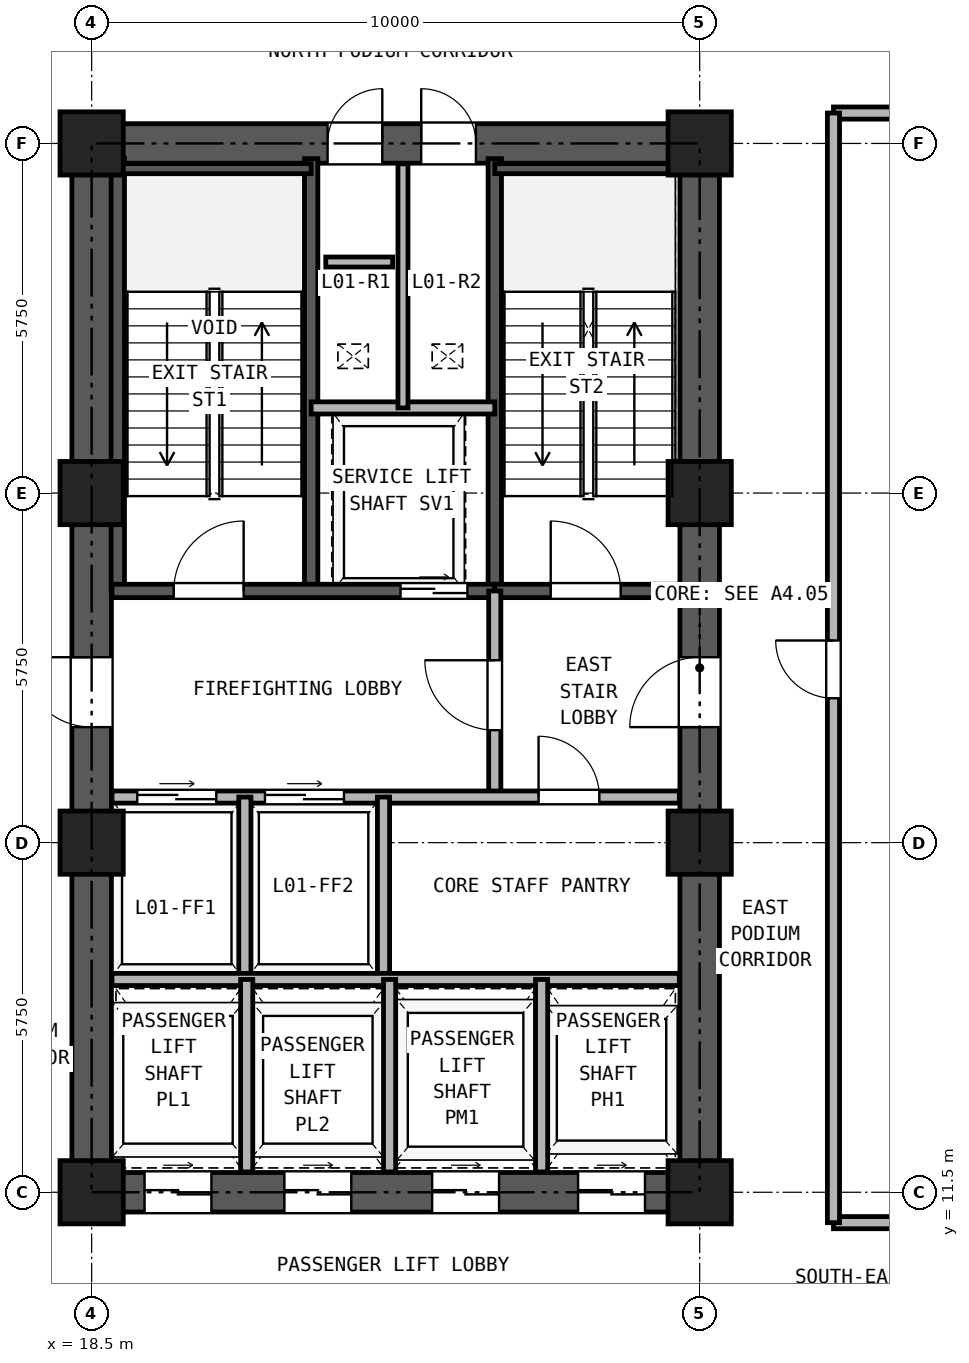
"""IFC4 building model, lengths in metres.
Left out: names, types, materials, properties, quantities, classifications, styles, units other than length and angle.
Written with IfcOpenShell. Run it as: python <this file> out.ifc"""

import sys

from ifc_helpers import new_model, si_unit, direction, frame, frame_2d, origin, origin_2d, place, context, subcontext, project, spatial, rectangle, hollow_rectangle, extrude, source, transform, mapped, element, fill, save


model = new_model("IFC4")
c1 = context("Model", 3, precision=1e-05, world=origin(), true_north=direction((0.0, 1.0)))
c2 = subcontext(c1, "Body", "Model", "MODEL_VIEW")
j1 = project(units=[si_unit("LENGTHUNIT", "METRE"), si_unit("PLANEANGLEUNIT", "RADIAN")], contexts=[c1])
p1 = place(None, origin())
s1 = spatial("IfcSite", under=j1, at=p1, CompositionType="ELEMENT")
p2 = place(p1, origin())
s2 = spatial("IfcBuilding", under=s1, at=p2, CompositionType="ELEMENT")
p3 = place(p2, frame((0.0, 0.0, 4.5)))
s3 = spatial("IfcBuildingStorey", under=s2, at=p3, CompositionType="ELEMENT", Elevation=4.5)
m1 = source(origin(), c2, "Body", "SweptSolid", [
    extrude(hollow_rectangle(XDim=1.04, YDim=1.04, WallThickness=0.065, at=origin_2d()), origin(), (0.0, 0.0, 1.0), 4.18),
])
for number, where, z_axis, x_axis in (
    (1, (18.5, 11.5, 0.0), (0.0, 0.0, 1.0), (1.0, 0.0, 0.0)),
    (2, (18.5, 17.25, 0.0), (0.0, 0.0, 1.0), (1.0, 0.0, 0.0)),
    (3, (18.5, 23.0, 0.0), (0.0, 0.0, 1.0), (1.0, 0.0, 0.0)),
    (4, (18.5, 28.75, 0.0), (0.0, 0.0, 1.0), (1.0, 0.0, 0.0)),
    (5, (28.5, 11.5, 0.0), (0.0, 0.0, 1.0), (1.0, 0.0, 0.0)),
    (6, (28.5, 17.25, 0.0), (0.0, 0.0, 1.0), (1.0, 0.0, 0.0)),
    (7, (28.5, 23.0, 0.0), (0.0, 0.0, 1.0), (1.0, 0.0, 0.0)),
    (8, (28.5, 28.75, 0.0), (0.0, 0.0, 1.0), (1.0, 0.0, 0.0)),
):
    element("IfcColumn", number, at=place(p3, frame(where, z_axis=z_axis, x_axis=x_axis)), inside=s3, PredefinedType="COLUMN", context=c2, shape_type="MappedRepresentation", body=[
        mapped(m1, transform((0.0, 0.0, 0.0), x_axis=(1.0, 0.0, 0.0), y_axis=(0.0, 1.0, 0.0), z_axis=(0.0, 0.0, 1.0), scale=1.0)),
    ])
p4 = place(p3, frame((18.175, 11.5, 0.0), z_axis=(0.0, 0.0, 1.0), x_axis=(1.0, 0.0, 0.0)))
e9 = element("IfcWall", 9, at=p4, inside=s3, PredefinedType="SHEAR", context=c2, shape_type="SweptSolid", body=[
    extrude(rectangle(XDim=10.65, YDim=0.65, at=frame_2d((5.325, 0.0))), origin(), (0.0, 0.0, 1.0), 4.18),
])
p5 = place(p4, frame((1.195, 0.0, 0.0)))
e10 = element("IfcOpeningElement", 10, at=p5, cuts=e9, PredefinedType="OPENING", context=c2, shape_type="SweptSolid", body=[
    extrude(rectangle(XDim=1.1, YDim=2.25, at=frame_2d((0.55, 1.125))), frame((0.0, 0.335, 0.0), z_axis=(0.0, -1.0, 0.0), x_axis=(1.0, 0.0, 0.0)), (0.0, 0.0, 1.0), 0.67),
])
p6 = place(p4, frame((3.495, 0.0, 0.0)))
e11 = element("IfcOpeningElement", 11, at=p6, cuts=e9, PredefinedType="OPENING", context=c2, shape_type="SweptSolid", body=[
    extrude(rectangle(XDim=1.1, YDim=2.25, at=frame_2d((0.55, 1.125))), frame((0.0, 0.335, 0.0), z_axis=(0.0, -1.0, 0.0), x_axis=(1.0, 0.0, 0.0)), (0.0, 0.0, 1.0), 0.67),
])
p7 = place(p4, frame((5.925, 0.0, 0.0)))
e12 = element("IfcOpeningElement", 12, at=p7, cuts=e9, PredefinedType="OPENING", context=c2, shape_type="SweptSolid", body=[
    extrude(rectangle(XDim=1.1, YDim=2.25, at=frame_2d((0.55, 1.125))), frame((0.0, 0.335, 0.0), z_axis=(0.0, -1.0, 0.0), x_axis=(1.0, 0.0, 0.0)), (0.0, 0.0, 1.0), 0.67),
])
p8 = place(p4, frame((8.325, 0.0, 0.0)))
e13 = element("IfcOpeningElement", 13, at=p8, cuts=e9, PredefinedType="OPENING", context=c2, shape_type="SweptSolid", body=[
    extrude(rectangle(XDim=1.1, YDim=2.25, at=frame_2d((0.55, 1.125))), frame((0.0, 0.335, 0.0), z_axis=(0.0, -1.0, 0.0), x_axis=(1.0, 0.0, 0.0)), (0.0, 0.0, 1.0), 0.67),
])
p9 = place(p3, frame((18.175, 28.75, 0.0), z_axis=(0.0, 0.0, 1.0), x_axis=(1.0, 0.0, 0.0)))
e14 = element("IfcWall", 14, at=p9, inside=s3, PredefinedType="SHEAR", context=c2, shape_type="SweptSolid", body=[
    extrude(rectangle(XDim=10.65, YDim=0.65, at=frame_2d((5.325, 0.0))), origin(), (0.0, 0.0, 1.0), 4.18),
])
p10 = place(p9, frame((4.205, 0.0, 0.0)))
e15 = element("IfcOpeningElement", 15, at=p10, cuts=e14, PredefinedType="OPENING", context=c2, shape_type="SweptSolid", body=[
    extrude(rectangle(XDim=0.9, YDim=2.05, at=frame_2d((0.45, 1.025))), frame((0.0, 0.335, 0.0), z_axis=(0.0, -1.0, 0.0), x_axis=(1.0, 0.0, 0.0)), (0.0, 0.0, 1.0), 0.67),
])
p11 = place(p9, frame((5.745, 0.0, 0.0)))
e16 = element("IfcOpeningElement", 16, at=p11, cuts=e14, PredefinedType="OPENING", context=c2, shape_type="SweptSolid", body=[
    extrude(rectangle(XDim=0.9, YDim=2.05, at=frame_2d((0.45, 1.025))), frame((0.0, 0.335, 0.0), z_axis=(0.0, -1.0, 0.0), x_axis=(1.0, 0.0, 0.0)), (0.0, 0.0, 1.0), 0.67),
])
p12 = place(p3, frame((18.5, 11.825, 0.0), z_axis=(0.0, 0.0, 1.0), x_axis=(0.0, 1.0, 0.0)))
e17 = element("IfcWall", 17, at=p12, inside=s3, PredefinedType="SHEAR", context=c2, shape_type="SweptSolid", body=[
    extrude(rectangle(XDim=16.6, YDim=0.65, at=frame_2d((8.3, 0.0))), origin(), (0.0, 0.0, 1.0), 4.18),
])
p13 = place(p12, frame((7.325, 0.0, 0.0)))
e18 = element("IfcOpeningElement", 18, at=p13, cuts=e17, PredefinedType="OPENING", context=c2, shape_type="SweptSolid", body=[
    extrude(rectangle(XDim=1.15, YDim=2.2, at=frame_2d((0.575, 1.1))), frame((0.0, 0.335, 0.0), z_axis=(0.0, -1.0, 0.0), x_axis=(1.0, 0.0, 0.0)), (0.0, 0.0, 1.0), 0.67),
])
p14 = place(p3, frame((28.5, 11.825, 0.0), z_axis=(0.0, 0.0, 1.0), x_axis=(0.0, 1.0, 0.0)))
e19 = element("IfcWall", 19, at=p14, inside=s3, PredefinedType="SHEAR", context=c2, shape_type="SweptSolid", body=[
    extrude(rectangle(XDim=16.6, YDim=0.65, at=frame_2d((8.3, 0.0))), origin(), (0.0, 0.0, 1.0), 4.18),
])
p15 = place(p14, frame((7.325, 0.0, 0.0)))
e20 = element("IfcOpeningElement", 20, at=p15, cuts=e19, PredefinedType="OPENING", context=c2, shape_type="SweptSolid", body=[
    extrude(rectangle(XDim=1.15, YDim=2.2, at=frame_2d((0.575, 1.1))), frame((0.0, 0.335, 0.0), z_axis=(0.0, -1.0, 0.0), x_axis=(1.0, 0.0, 0.0)), (0.0, 0.0, 1.0), 0.67),
])
for number, where, z_axis, x_axis in (
    (21, (18.93, 21.39, 0.0), (0.0, 0.0, 1.0), (0.0, 1.0, 0.0)),
    (22, (22.11, 21.39, 0.0), (0.0, 0.0, 1.0), (0.0, 1.0, 0.0)),
    (23, (25.13, 21.39, 0.0), (0.0, 0.0, 1.0), (0.0, 1.0, 0.0)),
):
    element("IfcWall", number, at=place(p3, frame(where, z_axis=z_axis, x_axis=x_axis)), inside=s3, PredefinedType="SOLIDWALL", context=c2, shape_type="SweptSolid", body=[
        extrude(rectangle(XDim=7.11, YDim=0.22, at=frame_2d((3.555, 0.0))), origin(), (0.0, 0.0, 1.0), 4.18),
    ])
p16 = place(p3, frame((18.835, 28.335, 0.0), z_axis=(0.0, 0.0, 1.0), x_axis=(1.0, 0.0, 0.0)))
e24 = element("IfcWall", 24, at=p16, inside=s3, PredefinedType="PARTITIONING", context=c2, shape_type="SweptSolid", body=[
    extrude(rectangle(XDim=3.275, YDim=0.165, at=frame_2d((1.638, 0.0))), origin(), (0.0, 0.0, 1.0), 4.18),
])
p17 = place(p3, frame((25.13, 28.335, 0.0), z_axis=(0.0, 0.0, 1.0), x_axis=(1.0, 0.0, 0.0)))
e25 = element("IfcWall", 25, at=p17, inside=s3, PredefinedType="PARTITIONING", context=c2, shape_type="SweptSolid", body=[
    extrude(rectangle(XDim=3.035, YDim=0.165, at=frame_2d((1.518, 0.0))), origin(), (0.0, 0.0, 1.0), 4.18),
])
p18 = place(p3, frame((18.835, 21.39, 0.0), z_axis=(0.0, 0.0, 1.0), x_axis=(1.0, 0.0, 0.0)))
e26 = element("IfcWall", 26, at=p18, inside=s3, PredefinedType="SOLIDWALL", context=c2, shape_type="SweptSolid", body=[
    extrude(rectangle(XDim=6.295, YDim=0.22, at=frame_2d((3.147, 0.0))), origin(), (0.0, 0.0, 1.0), 4.18),
])
p19 = place(p18, frame((1.015, 0.0, 0.0)))
e27 = element("IfcOpeningElement", 27, at=p19, cuts=e26, PredefinedType="OPENING", context=c2, shape_type="SweptSolid", body=[
    extrude(rectangle(XDim=1.15, YDim=2.2, at=frame_2d((0.575, 1.1))), frame((0.0, 0.12, 0.0), z_axis=(0.0, -1.0, 0.0), x_axis=(1.0, 0.0, 0.0)), (0.0, 0.0, 1.0), 0.24),
])
p20 = place(p18, frame((4.745, 0.0, 0.0)))
e28 = element("IfcOpeningElement", 28, at=p20, cuts=e26, PredefinedType="OPENING", context=c2, shape_type="SweptSolid", body=[
    extrude(rectangle(XDim=1.1, YDim=2.25, at=frame_2d((0.55, 1.125))), frame((0.0, 0.12, 0.0), z_axis=(0.0, -1.0, 0.0), x_axis=(1.0, 0.0, 0.0)), (0.0, 0.0, 1.0), 0.24),
])
p21 = place(p3, frame((25.13, 21.39, 0.0), z_axis=(0.0, 0.0, 1.0), x_axis=(1.0, 0.0, 0.0)))
e29 = element("IfcWall", 29, at=p21, inside=s3, PredefinedType="SOLIDWALL", context=c2, shape_type="SweptSolid", body=[
    extrude(rectangle(XDim=3.035, YDim=0.22, at=frame_2d((1.518, 0.0))), origin(), (0.0, 0.0, 1.0), 4.18),
])
p22 = place(p21, frame((0.92, 0.0, 0.0)))
e30 = element("IfcOpeningElement", 30, at=p22, cuts=e29, PredefinedType="OPENING", context=c2, shape_type="SweptSolid", body=[
    extrude(rectangle(XDim=1.15, YDim=2.2, at=frame_2d((0.575, 1.1))), frame((0.0, 0.12, 0.0), z_axis=(0.0, -1.0, 0.0), x_axis=(1.0, 0.0, 0.0)), (0.0, 0.0, 1.0), 0.24),
])
p23 = place(p3, frame((22.11, 24.4, 0.0), z_axis=(0.0, 0.0, 1.0), x_axis=(1.0, 0.0, 0.0)))
e31 = element("IfcWall", 31, at=p23, inside=s3, PredefinedType="PARTITIONING", context=c2, shape_type="SweptSolid", body=[
    extrude(rectangle(XDim=3.02, YDim=0.2, at=frame_2d((1.51, 0.0))), origin(), (0.0, 0.0, 1.0), 4.18),
])
p24 = place(p3, frame((23.62, 24.4, 0.0), z_axis=(0.0, 0.0, 1.0), x_axis=(0.0, 1.0, 0.0)))
e32 = element("IfcWall", 32, at=p24, inside=s3, PredefinedType="PARTITIONING", context=c2, shape_type="SweptSolid", body=[
    extrude(rectangle(XDim=4.015, YDim=0.165, at=frame_2d((2.008, 0.0))), origin(), (0.0, 0.0, 1.0), 4.18),
])
p25 = place(p3, frame((25.13, 18.0, 0.0), z_axis=(0.0, 0.0, 1.0), x_axis=(0.0, 1.0, 0.0)))
e33 = element("IfcWall", 33, at=p25, inside=s3, PredefinedType="PARTITIONING", context=c2, shape_type="SweptSolid", body=[
    extrude(rectangle(XDim=3.39, YDim=0.2, at=frame_2d((1.695, 0.0))), origin(), (0.0, 0.0, 1.0), 4.18),
])
p26 = place(p25, frame((1.1, 0.0, 0.0)))
e34 = element("IfcOpeningElement", 34, at=p26, cuts=e33, PredefinedType="OPENING", context=c2, shape_type="SweptSolid", body=[
    extrude(rectangle(XDim=1.15, YDim=2.2, at=frame_2d((0.575, 1.1))), frame((0.0, 0.11, 0.0), z_axis=(0.0, -1.0, 0.0), x_axis=(1.0, 0.0, 0.0)), (0.0, 0.0, 1.0), 0.22),
])
p27 = place(p3, frame((18.835, 18.0, 0.0), z_axis=(0.0, 0.0, 1.0), x_axis=(1.0, 0.0, 0.0)))
e35 = element("IfcWall", 35, at=p27, inside=s3, PredefinedType="PARTITIONING", context=c2, shape_type="SweptSolid", body=[
    extrude(rectangle(XDim=9.33, YDim=0.2, at=frame_2d((4.665, 0.0))), origin(), (0.0, 0.0, 1.0), 4.18),
])
p28 = place(p27, frame((0.415, 0.0, 0.0)))
e36 = element("IfcOpeningElement", 36, at=p28, cuts=e35, PredefinedType="OPENING", context=c2, shape_type="SweptSolid", body=[
    extrude(rectangle(XDim=1.3, YDim=2.3, at=frame_2d((0.65, 1.15))), frame((0.0, 0.11, 0.0), z_axis=(0.0, -1.0, 0.0), x_axis=(1.0, 0.0, 0.0)), (0.0, 0.0, 1.0), 0.22),
])
p29 = place(p27, frame((2.515, 0.0, 0.0)))
e37 = element("IfcOpeningElement", 37, at=p29, cuts=e35, PredefinedType="OPENING", context=c2, shape_type="SweptSolid", body=[
    extrude(rectangle(XDim=1.3, YDim=2.3, at=frame_2d((0.65, 1.15))), frame((0.0, 0.11, 0.0), z_axis=(0.0, -1.0, 0.0), x_axis=(1.0, 0.0, 0.0)), (0.0, 0.0, 1.0), 0.22),
])
p30 = place(p27, frame((7.015, 0.0, 0.0)))
e38 = element("IfcOpeningElement", 38, at=p30, cuts=e35, PredefinedType="OPENING", context=c2, shape_type="SweptSolid", body=[
    extrude(rectangle(XDim=1.0, YDim=2.15, at=frame_2d((0.5, 1.075))), frame((0.0, 0.11, 0.0), z_axis=(0.0, -1.0, 0.0), x_axis=(1.0, 0.0, 0.0)), (0.0, 0.0, 1.0), 0.22),
])
for number, where, z_axis, x_axis in (
    (39, (21.02, 15.0, 0.0), (0.0, 0.0, 1.0), (0.0, 1.0, 0.0)),
    (40, (23.3, 15.0, 0.0), (0.0, 0.0, 1.0), (0.0, 1.0, 0.0)),
):
    element("IfcWall", number, at=place(p3, frame(where, z_axis=z_axis, x_axis=x_axis)), inside=s3, PredefinedType="PARTITIONING", context=c2, shape_type="SweptSolid", body=[
        extrude(rectangle(XDim=3.0, YDim=0.2, at=frame_2d((1.5, 0.0))), origin(), (0.0, 0.0, 1.0), 4.18),
    ])
p31 = place(p3, frame((18.835, 15.0, 0.0), z_axis=(0.0, 0.0, 1.0), x_axis=(1.0, 0.0, 0.0)))
e41 = element("IfcWall", 41, at=p31, inside=s3, PredefinedType="PARTITIONING", context=c2, shape_type="SweptSolid", body=[
    extrude(rectangle(XDim=9.33, YDim=0.2, at=frame_2d((4.665, 0.0))), origin(), (0.0, 0.0, 1.0), 4.18),
])
for number, where, z_axis, x_axis in (
    (42, (21.05, 11.835, 0.0), (0.0, 0.0, 1.0), (0.0, 1.0, 0.0)),
    (43, (23.4, 11.835, 0.0), (0.0, 0.0, 1.0), (0.0, 1.0, 0.0)),
    (44, (25.9, 11.835, 0.0), (0.0, 0.0, 1.0), (0.0, 1.0, 0.0)),
):
    element("IfcWall", number, at=place(p3, frame(where, z_axis=z_axis, x_axis=x_axis)), inside=s3, PredefinedType="PARTITIONING", context=c2, shape_type="SweptSolid", body=[
        extrude(rectangle(XDim=3.165, YDim=0.2, at=frame_2d((1.583, 0.0))), origin(), (0.0, 0.0, 1.0), 4.18),
    ])
for number, where, z_axis, x_axis in (
    (45, (30.7, 11.0, 0.0), (0.0, 0.0, 1.0), (1.0, 0.0, 0.0)),
    (46, (30.7, 29.25, 0.0), (0.0, 0.0, 1.0), (1.0, 0.0, 0.0)),
):
    element("IfcWall", number, at=place(p3, frame(where, z_axis=z_axis, x_axis=x_axis)), inside=s3, PredefinedType="PARTITIONING", context=c2, shape_type="SweptSolid", body=[
        extrude(rectangle(XDim=8.8, YDim=0.2, at=frame_2d((4.4, 0.0))), origin(), (0.0, 0.0, 1.0), 4.18),
    ])
p32 = place(p3, frame((30.7, 11.0, 0.0), z_axis=(0.0, 0.0, 1.0), x_axis=(0.0, 1.0, 0.0)))
e47 = element("IfcWall", 47, at=p32, inside=s3, PredefinedType="PARTITIONING", context=c2, shape_type="SweptSolid", body=[
    extrude(rectangle(XDim=18.25, YDim=0.2, at=frame_2d((9.125, 0.0))), origin(), (0.0, 0.0, 1.0), 4.18),
])
p33 = place(p32, frame((8.625, 0.0, 0.0)))
e48 = element("IfcOpeningElement", 48, at=p33, cuts=e47, PredefinedType="OPENING", context=c2, shape_type="SweptSolid", body=[
    extrude(rectangle(XDim=0.95, YDim=2.15, at=frame_2d((0.475, 1.075))), frame((0.0, 0.11, 0.0), z_axis=(0.0, -1.0, 0.0), x_axis=(1.0, 0.0, 0.0)), (0.0, 0.0, 1.0), 0.22),
])
p34 = place(p3, frame((22.35, 26.8, 0.0), z_axis=(0.0, 0.0, 1.0), x_axis=(1.0, 0.0, 0.0)))
e49 = element("IfcWall", 49, at=p34, inside=s3, PredefinedType="PARTITIONING", context=c2, shape_type="SweptSolid", body=[
    extrude(rectangle(XDim=1.1, YDim=0.165, at=frame_2d((0.55, 0.0))), origin(), (0.0, 0.0, 1.0), 4.18),
])
p35 = place(p19, frame((1.15, 0.0, 0.0), z_axis=(0.0, 0.0, 1.0), x_axis=(-1.0, 0.0, 0.0)))
e50 = element("IfcDoor", 50, at=p35, inside=s3, OperationType="SINGLE_SWING_RIGHT", PredefinedType="DOOR", context=c2, shape_type="SweptSolid", body=[
    extrude(rectangle(XDim=1.15, YDim=2.2, at=frame_2d((0.575, 1.1))), frame((0.0, 0.025, 0.0), z_axis=(0.0, -1.0, 0.0), x_axis=(1.0, 0.0, 0.0)), (0.0, 0.0, 1.0), 0.05),
])
fill(e27, e50)
p36 = place(p22, frame((1.15, 0.0, 0.0), z_axis=(0.0, 0.0, 1.0), x_axis=(-1.0, 0.0, 0.0)))
e51 = element("IfcDoor", 51, at=p36, inside=s3, OperationType="SINGLE_SWING_LEFT", PredefinedType="DOOR", context=c2, shape_type="SweptSolid", body=[
    extrude(rectangle(XDim=1.15, YDim=2.2, at=frame_2d((0.575, 1.1))), frame((0.0, 0.025, 0.0), z_axis=(0.0, -1.0, 0.0), x_axis=(1.0, 0.0, 0.0)), (0.0, 0.0, 1.0), 0.05),
])
fill(e30, e51)
p37 = place(p20, frame((1.1, 0.0, 0.0), z_axis=(0.0, 0.0, 1.0), x_axis=(-1.0, 0.0, 0.0)))
e52 = element("IfcDoor", 52, at=p37, inside=s3, OperationType="DOUBLE_DOOR_SLIDING", PredefinedType="DOOR", context=c2, shape_type="SweptSolid", body=[
    extrude(rectangle(XDim=1.1, YDim=2.25, at=frame_2d((0.55, 1.125))), frame((0.0, 0.025, 0.0), z_axis=(0.0, -1.0, 0.0), x_axis=(1.0, 0.0, 0.0)), (0.0, 0.0, 1.0), 0.05),
])
fill(e28, e52)
p38 = place(p26, origin())
e53 = element("IfcDoor", 53, at=p38, inside=s3, OperationType="SINGLE_SWING_RIGHT", PredefinedType="DOOR", context=c2, shape_type="SweptSolid", body=[
    extrude(rectangle(XDim=1.15, YDim=2.2, at=frame_2d((0.575, 1.1))), frame((0.0, 0.025, 0.0), z_axis=(0.0, -1.0, 0.0), x_axis=(1.0, 0.0, 0.0)), (0.0, 0.0, 1.0), 0.05),
])
fill(e34, e53)
p39 = place(p28, origin())
e54 = element("IfcDoor", 54, at=p39, inside=s3, OperationType="DOUBLE_DOOR_SLIDING", PredefinedType="DOOR", context=c2, shape_type="SweptSolid", body=[
    extrude(rectangle(XDim=1.3, YDim=2.3, at=frame_2d((0.65, 1.15))), frame((0.0, 0.025, 0.0), z_axis=(0.0, -1.0, 0.0), x_axis=(1.0, 0.0, 0.0)), (0.0, 0.0, 1.0), 0.05),
])
fill(e36, e54)
p40 = place(p29, origin())
e55 = element("IfcDoor", 55, at=p40, inside=s3, OperationType="DOUBLE_DOOR_SLIDING", PredefinedType="DOOR", context=c2, shape_type="SweptSolid", body=[
    extrude(rectangle(XDim=1.3, YDim=2.3, at=frame_2d((0.65, 1.15))), frame((0.0, 0.025, 0.0), z_axis=(0.0, -1.0, 0.0), x_axis=(1.0, 0.0, 0.0)), (0.0, 0.0, 1.0), 0.05),
])
fill(e37, e55)
p41 = place(p30, frame((1.0, 0.0, 0.0), z_axis=(0.0, 0.0, 1.0), x_axis=(-1.0, 0.0, 0.0)))
e56 = element("IfcDoor", 56, at=p41, inside=s3, OperationType="SINGLE_SWING_LEFT", PredefinedType="DOOR", context=c2, shape_type="SweptSolid", body=[
    extrude(rectangle(XDim=1.0, YDim=2.15, at=frame_2d((0.5, 1.075))), frame((0.0, 0.025, 0.0), z_axis=(0.0, -1.0, 0.0), x_axis=(1.0, 0.0, 0.0)), (0.0, 0.0, 1.0), 0.05),
])
fill(e38, e56)
p42 = place(p13, frame((1.15, 0.0, 0.0), z_axis=(0.0, 0.0, 1.0), x_axis=(-1.0, 0.0, 0.0)))
e57 = element("IfcDoor", 57, at=p42, inside=s3, OperationType="SINGLE_SWING_RIGHT", PredefinedType="DOOR", context=c2, shape_type="SweptSolid", body=[
    extrude(rectangle(XDim=1.15, YDim=2.2, at=frame_2d((0.575, 1.1))), frame((0.0, 0.025, 0.0), z_axis=(0.0, -1.0, 0.0), x_axis=(1.0, 0.0, 0.0)), (0.0, 0.0, 1.0), 0.05),
])
fill(e18, e57)
p43 = place(p15, origin())
e58 = element("IfcDoor", 58, at=p43, inside=s3, OperationType="SINGLE_SWING_LEFT", PredefinedType="DOOR", context=c2, shape_type="SweptSolid", body=[
    extrude(rectangle(XDim=1.15, YDim=2.2, at=frame_2d((0.575, 1.1))), frame((0.0, 0.025, 0.0), z_axis=(0.0, -1.0, 0.0), x_axis=(1.0, 0.0, 0.0)), (0.0, 0.0, 1.0), 0.05),
])
fill(e20, e58)
p44 = place(p10, origin())
e59 = element("IfcDoor", 59, at=p44, inside=s3, OperationType="SINGLE_SWING_RIGHT", PredefinedType="DOOR", context=c2, shape_type="SweptSolid", body=[
    extrude(rectangle(XDim=0.9, YDim=2.05, at=frame_2d((0.45, 1.025))), frame((0.0, 0.025, 0.0), z_axis=(0.0, -1.0, 0.0), x_axis=(1.0, 0.0, 0.0)), (0.0, 0.0, 1.0), 0.05),
])
fill(e15, e59)
p45 = place(p11, origin())
e60 = element("IfcDoor", 60, at=p45, inside=s3, OperationType="SINGLE_SWING_LEFT", PredefinedType="DOOR", context=c2, shape_type="SweptSolid", body=[
    extrude(rectangle(XDim=0.9, YDim=2.05, at=frame_2d((0.45, 1.025))), frame((0.0, 0.025, 0.0), z_axis=(0.0, -1.0, 0.0), x_axis=(1.0, 0.0, 0.0)), (0.0, 0.0, 1.0), 0.05),
])
fill(e16, e60)
p46 = place(p5, frame((1.1, 0.0, 0.0), z_axis=(0.0, 0.0, 1.0), x_axis=(-1.0, 0.0, 0.0)))
e61 = element("IfcDoor", 61, at=p46, inside=s3, OperationType="DOUBLE_DOOR_SLIDING", PredefinedType="DOOR", context=c2, shape_type="SweptSolid", body=[
    extrude(rectangle(XDim=1.1, YDim=2.25, at=frame_2d((0.55, 1.125))), frame((0.0, 0.025, 0.0), z_axis=(0.0, -1.0, 0.0), x_axis=(1.0, 0.0, 0.0)), (0.0, 0.0, 1.0), 0.05),
])
fill(e10, e61)
p47 = place(p6, frame((1.1, 0.0, 0.0), z_axis=(0.0, 0.0, 1.0), x_axis=(-1.0, 0.0, 0.0)))
e62 = element("IfcDoor", 62, at=p47, inside=s3, OperationType="DOUBLE_DOOR_SLIDING", PredefinedType="DOOR", context=c2, shape_type="SweptSolid", body=[
    extrude(rectangle(XDim=1.1, YDim=2.25, at=frame_2d((0.55, 1.125))), frame((0.0, 0.025, 0.0), z_axis=(0.0, -1.0, 0.0), x_axis=(1.0, 0.0, 0.0)), (0.0, 0.0, 1.0), 0.05),
])
fill(e11, e62)
p48 = place(p7, frame((1.1, 0.0, 0.0), z_axis=(0.0, 0.0, 1.0), x_axis=(-1.0, 0.0, 0.0)))
e63 = element("IfcDoor", 63, at=p48, inside=s3, OperationType="DOUBLE_DOOR_SLIDING", PredefinedType="DOOR", context=c2, shape_type="SweptSolid", body=[
    extrude(rectangle(XDim=1.1, YDim=2.25, at=frame_2d((0.55, 1.125))), frame((0.0, 0.025, 0.0), z_axis=(0.0, -1.0, 0.0), x_axis=(1.0, 0.0, 0.0)), (0.0, 0.0, 1.0), 0.05),
])
fill(e12, e63)
p49 = place(p8, frame((1.1, 0.0, 0.0), z_axis=(0.0, 0.0, 1.0), x_axis=(-1.0, 0.0, 0.0)))
e64 = element("IfcDoor", 64, at=p49, inside=s3, OperationType="DOUBLE_DOOR_SLIDING", PredefinedType="DOOR", context=c2, shape_type="SweptSolid", body=[
    extrude(rectangle(XDim=1.1, YDim=2.25, at=frame_2d((0.55, 1.125))), frame((0.0, 0.025, 0.0), z_axis=(0.0, -1.0, 0.0), x_axis=(1.0, 0.0, 0.0)), (0.0, 0.0, 1.0), 0.05),
])
fill(e13, e64)
p50 = place(p33, origin())
e65 = element("IfcDoor", 65, at=p50, inside=s3, OperationType="SINGLE_SWING_RIGHT", PredefinedType="DOOR", context=c2, shape_type="SweptSolid", body=[
    extrude(rectangle(XDim=0.95, YDim=2.15, at=frame_2d((0.475, 1.075))), frame((0.0, 0.025, 0.0), z_axis=(0.0, -1.0, 0.0), x_axis=(1.0, 0.0, 0.0)), (0.0, 0.0, 1.0), 0.05),
])
fill(e48, e65)
save(model, sys.argv[1])
